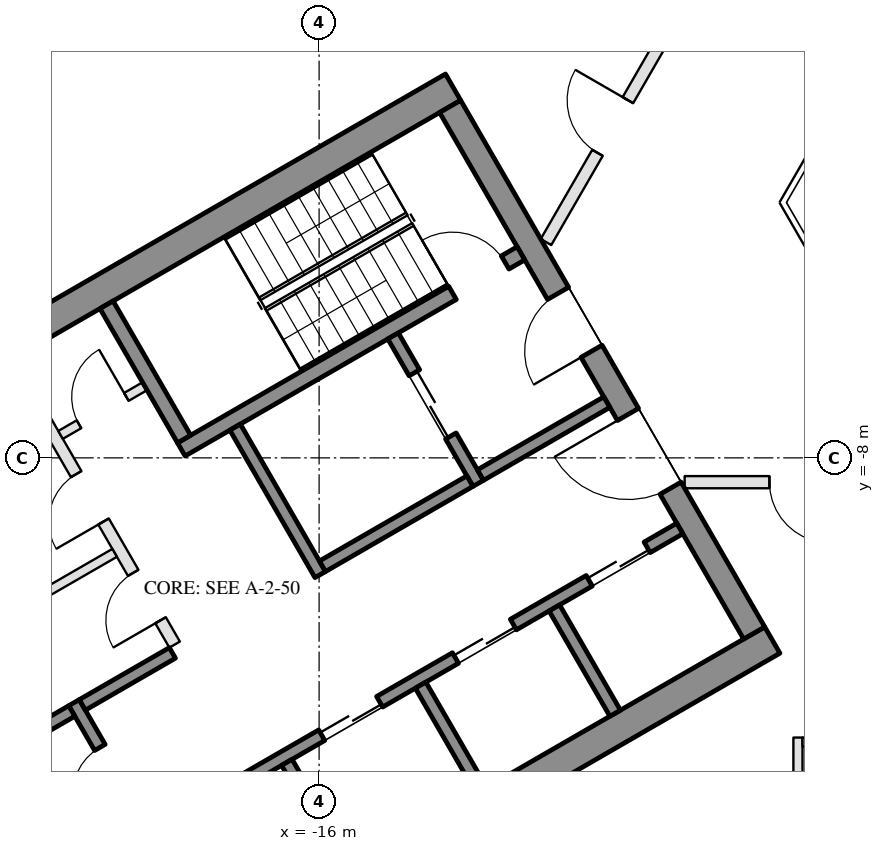
"""IFC4 building model, lengths in metres.
Left out: names, types, materials, properties, quantities, classifications, styles, units other than length and angle.
Written with IfcOpenShell. Run it as: python <this file> out.ifc"""

import sys

from ifc_helpers import new_model, si_unit, direction, frame, frame_2d, origin, place, context, subcontext, project, spatial, rectangle, extrude, element, fill, save


model = new_model("IFC4")
c1 = context("Model", 3, precision=1e-05, world=origin(), true_north=direction((0.0, 1.0)))
c2 = subcontext(c1, "Body", "Model", "MODEL_VIEW")
j1 = project(units=[si_unit("LENGTHUNIT", "METRE"), si_unit("PLANEANGLEUNIT", "RADIAN")], contexts=[c1])
p1 = place(None, origin())
s1 = spatial("IfcSite", under=j1, at=p1, CompositionType="ELEMENT")
p2 = place(p1, origin())
s2 = spatial("IfcBuilding", under=s1, at=p2, CompositionType="ELEMENT")
p3 = place(p2, frame((0.0, 0.0, 216.9)))
s3 = spatial("IfcBuildingStorey", under=s2, at=p3, CompositionType="ELEMENT", Elevation=216.9)
p4 = place(p3, frame((-20.309, 1.934, 0.0), z_axis=(0.0, 0.0, 1.0), x_axis=(-0.499992114976, -0.866029956157, 0.0)))
e1 = element("IfcWall", 1, at=p4, inside=s3, PredefinedType="SOLIDWALL", context=c2, shape_type="SweptSolid", body=[
    extrude(rectangle(XDim=6.74, YDim=0.35, at=frame_2d((3.37, 0.0))), origin(), (0.0, 0.0, 1.0), 3.55),
])
p5 = place(p4, frame((0.77, 0.0, 0.0)))
e2 = element("IfcOpeningElement", 2, at=p5, cuts=e1, PredefinedType="OPENING", context=c2, shape_type="SweptSolid", body=[
    extrude(rectangle(XDim=2.4, YDim=2.4, at=frame_2d((1.2, 1.2))), frame((0.0, 0.185, 0.0), z_axis=(0.0, -1.0, 0.0), x_axis=(1.0, 0.0, 0.0)), (0.0, 0.0, 1.0), 0.37),
])
p6 = place(p4, frame((3.47, 0.0, 0.3)))
e3 = element("IfcOpeningElement", 3, at=p6, cuts=e1, PredefinedType="OPENING", context=c2, shape_type="SweptSolid", body=[
    extrude(rectangle(XDim=2.9, YDim=2.65, at=frame_2d((1.45, 1.325))), frame((0.0, 0.185, 0.0), z_axis=(0.0, -1.0, 0.0), x_axis=(1.0, 0.0, 0.0)), (0.0, 0.0, 1.0), 0.37),
])
for number, where, z_axis, x_axis in (
    (4, (-13.797, -1.903, 0.0), (0.0, 0.0, 1.0), (-0.866, -0.5, 0.0)),
    (5, (-8.547, -10.997, 0.0), (0.0, 0.0, 1.0), (-0.866, -0.5, 0.0)),
):
    element("IfcWall", number, at=place(p3, frame(where, z_axis=z_axis, x_axis=x_axis)), inside=s3, PredefinedType="SHEAR", context=c2, shape_type="SweptSolid", body=[
        extrude(rectangle(XDim=14.837, YDim=0.5, at=frame_2d((7.418, 0.0))), origin(), (0.0, 0.0, 1.0), 3.5),
    ])
p7 = place(p3, frame((-13.845, -2.22, 0.0), z_axis=(0.0, 0.0, 1.0), x_axis=(0.500004234368, -0.866022959057, 0.0)))
e6 = element("IfcWall", 6, at=p7, inside=s3, PredefinedType="SHEAR", context=c2, shape_type="SweptSolid", body=[
    extrude(rectangle(XDim=10.0, YDim=0.4, at=frame_2d((5.0, 0.0))), origin(), (0.0, 0.0, 1.0), 3.5),
])
p8 = place(p7, frame((3.55, 0.0, 0.0)))
e7 = element("IfcOpeningElement", 7, at=p8, cuts=e6, PredefinedType="OPENING", context=c2, shape_type="SweptSolid", body=[
    extrude(rectangle(XDim=1.1, YDim=2.1, at=frame_2d((0.55, 1.05))), frame((0.0, 0.21, 0.0), z_axis=(0.0, -1.0, 0.0), x_axis=(1.0, 0.0, 0.0)), (0.0, 0.0, 1.0), 0.42),
])
p9 = place(p7, frame((5.85, 0.0, 0.0)))
e8 = element("IfcOpeningElement", 8, at=p9, cuts=e6, PredefinedType="OPENING", context=c2, shape_type="SweptSolid", body=[
    extrude(rectangle(XDim=1.4, YDim=2.1, at=frame_2d((0.7, 1.05))), frame((0.0, 0.21, 0.0), z_axis=(0.0, -1.0, 0.0), x_axis=(1.0, 0.0, 0.0)), (0.0, 0.0, 1.0), 0.42),
])
p10 = place(p3, frame((-12.681, -4.636, 0.0), z_axis=(0.0, 0.0, 1.0), x_axis=(-0.866021702275, -0.500006411147, 0.0)))
e9 = element("IfcWall", 9, at=p10, inside=s3, PredefinedType="SHEAR", context=c2, shape_type="SweptSolid", body=[
    extrude(rectangle(XDim=6.45, YDim=0.25, at=frame_2d((3.225, 0.0))), origin(), (0.0, 0.0, 1.0), 3.5),
])
p11 = place(p10, frame((0.3, 0.0, 0.0)))
e10 = element("IfcOpeningElement", 10, at=p11, cuts=e9, PredefinedType="OPENING", context=c2, shape_type="SweptSolid", body=[
    extrude(rectangle(XDim=1.0, YDim=2.1, at=frame_2d((0.5, 1.05))), frame((0.0, 0.135, 0.0), z_axis=(0.0, -1.0, 0.0), x_axis=(1.0, 0.0, 0.0)), (0.0, 0.0, 1.0), 0.27),
])
p12 = place(p3, frame((-19.496, -5.482, 0.0), z_axis=(0.0, 0.0, 1.0), x_axis=(0.499990435942, -0.866030925526, 0.0)))
e11 = element("IfcWall", 11, at=p12, inside=s3, PredefinedType="SHEAR", context=c2, shape_type="SweptSolid", body=[
    extrude(rectangle(XDim=2.55, YDim=0.25, at=frame_2d((1.275, 0.0))), origin(), (0.0, 0.0, 1.0), 3.5),
])
p13 = place(p3, frame((-17.381, -7.495, 0.0), z_axis=(0.0, 0.0, 1.0), x_axis=(0.500011755427, -0.866018616679, 0.0)))
e12 = element("IfcWall", 12, at=p13, inside=s3, PredefinedType="SHEAR", context=c2, shape_type="SweptSolid", body=[
    extrude(rectangle(XDim=2.8, YDim=0.2, at=frame_2d((1.4, 0.0))), origin(), (0.0, 0.0, 1.0), 3.5),
])
p14 = place(p3, frame((-14.783, -5.995, 0.0), z_axis=(0.0, 0.0, 1.0), x_axis=(0.49994636267, -0.866056369097, 0.0)))
e13 = element("IfcWall", 13, at=p14, inside=s3, PredefinedType="SHEAR", context=c2, shape_type="SweptSolid", body=[
    extrude(rectangle(XDim=2.8, YDim=0.2, at=frame_2d((1.4, 0.0))), origin(), (0.0, 0.0, 1.0), 3.5),
])
p15 = place(p14, frame((0.7, 0.0, 0.0)))
e14 = element("IfcOpeningElement", 14, at=p15, cuts=e13, PredefinedType="OPENING", context=c2, shape_type="SweptSolid", body=[
    extrude(rectangle(XDim=1.2, YDim=2.1, at=frame_2d((0.6, 1.05))), frame((0.0, 0.11, 0.0), z_axis=(0.0, -1.0, 0.0), x_axis=(1.0, 0.0, 0.0)), (0.0, 0.0, 1.0), 0.22),
])
p16 = place(p3, frame((-13.52, -8.383, 0.0), z_axis=(0.0, 0.0, 1.0), x_axis=(-0.866034573852, -0.49998411664, 0.0)))
e15 = element("IfcWall", 15, at=p16, inside=s3, PredefinedType="SHEAR", context=c2, shape_type="SweptSolid", body=[
    extrude(rectangle(XDim=2.8, YDim=0.2, at=frame_2d((1.4, 0.0))), origin(), (0.0, 0.0, 1.0), 3.5),
])
p17 = place(p3, frame((-11.268, -7.083, 0.0), z_axis=(0.0, 0.0, 1.0), x_axis=(-0.866050077142, -0.499957262057, 0.0)))
e16 = element("IfcWall", 16, at=p17, inside=s3, PredefinedType="SHEAR", context=c2, shape_type="SweptSolid", body=[
    extrude(rectangle(XDim=2.4, YDim=0.2, at=frame_2d((1.2, 0.0))), origin(), (0.0, 0.0, 1.0), 3.5),
])
p18 = place(p3, frame((-10.068, -9.162, 0.0), z_axis=(0.0, 0.0, 1.0), x_axis=(-0.866032725843, -0.499987317609, 0.0)))
e17 = element("IfcWall", 17, at=p18, inside=s3, PredefinedType="SHEAR", context=c2, shape_type="SweptSolid", body=[
    extrude(rectangle(XDim=10.16, YDim=0.2, at=frame_2d((5.08, 0.0))), origin(), (0.0, 0.0, 1.0), 3.5),
])
p19 = place(p18, frame((0.62, 0.0, 0.0)))
e18 = element("IfcOpeningElement", 18, at=p19, cuts=e17, PredefinedType="OPENING", context=c2, shape_type="SweptSolid", body=[
    extrude(rectangle(XDim=1.1, YDim=2.1, at=frame_2d((0.55, 1.05))), frame((0.0, 0.11, 0.0), z_axis=(0.0, -1.0, 0.0), x_axis=(1.0, 0.0, 0.0)), (0.0, 0.0, 1.0), 0.22),
])
p20 = place(p18, frame((3.16, 0.0, 0.0)))
e19 = element("IfcOpeningElement", 19, at=p20, cuts=e17, PredefinedType="OPENING", context=c2, shape_type="SweptSolid", body=[
    extrude(rectangle(XDim=1.1, YDim=2.1, at=frame_2d((0.55, 1.05))), frame((0.0, 0.11, 0.0), z_axis=(0.0, -1.0, 0.0), x_axis=(1.0, 0.0, 0.0)), (0.0, 0.0, 1.0), 0.22),
])
p21 = place(p18, frame((5.7, 0.0, 0.0)))
e20 = element("IfcOpeningElement", 20, at=p21, cuts=e17, PredefinedType="OPENING", context=c2, shape_type="SweptSolid", body=[
    extrude(rectangle(XDim=1.1, YDim=2.1, at=frame_2d((0.55, 1.05))), frame((0.0, 0.11, 0.0), z_axis=(0.0, -1.0, 0.0), x_axis=(1.0, 0.0, 0.0)), (0.0, 0.0, 1.0), 0.22),
])
p22 = place(p18, frame((8.24, 0.0, 0.0)))
e21 = element("IfcOpeningElement", 21, at=p22, cuts=e17, PredefinedType="OPENING", context=c2, shape_type="SweptSolid", body=[
    extrude(rectangle(XDim=1.1, YDim=2.1, at=frame_2d((0.55, 1.05))), frame((0.0, 0.11, 0.0), z_axis=(0.0, -1.0, 0.0), x_axis=(1.0, 0.0, 0.0)), (0.0, 0.0, 1.0), 0.22),
])
p23 = place(p3, frame((-20.031, -12.026, 0.0), z_axis=(0.0, 0.0, 1.0), x_axis=(0.500033551112, -0.866006032174, 0.0)))
e22 = element("IfcWall", 22, at=p23, inside=s3, PredefinedType="SHEAR", context=c2, shape_type="SweptSolid", body=[
    extrude(rectangle(XDim=2.4, YDim=0.2, at=frame_2d((1.2, 0.0))), origin(), (0.0, 0.0, 1.0), 3.5),
])
p24 = place(p23, frame((0.85, 0.0, 0.0)))
e23 = element("IfcOpeningElement", 23, at=p24, cuts=e22, PredefinedType="OPENING", context=c2, shape_type="SweptSolid", body=[
    extrude(rectangle(XDim=0.9, YDim=2.1, at=frame_2d((0.45, 1.05))), frame((0.0, 0.11, 0.0), z_axis=(0.0, -1.0, 0.0), x_axis=(1.0, 0.0, 0.0)), (0.0, 0.0, 1.0), 0.22),
])
p25 = place(p3, frame((-18.413, -11.208, 0.0), z_axis=(0.0, 0.0, 1.0), x_axis=(-0.866038183914, -0.499977863513, 0.0)))
e24 = element("IfcWall", 24, at=p25, inside=s3, PredefinedType="SHEAR", context=c2, shape_type="SweptSolid", body=[
    extrude(rectangle(XDim=1.71, YDim=0.2, at=frame_2d((0.855, 0.0))), origin(), (0.0, 0.0, 1.0), 3.5),
])
for number, where, z_axis, x_axis in (
    (25, (-12.131, -10.468, 0.0), (0.0, 0.0, 1.0), (0.5, -0.866, 0.0)),
    (26, (-14.331, -11.738, 0.0), (0.0, 0.0, 1.0), (0.5, -0.866, 0.0)),
    (27, (-16.531, -13.008, 0.0), (0.0, 0.0, 1.0), (0.5, -0.866, 0.0)),
):
    element("IfcWall", number, at=place(p3, frame(where, z_axis=z_axis, x_axis=x_axis)), inside=s3, PredefinedType="SHEAR", context=c2, shape_type="SweptSolid", body=[
        extrude(rectangle(XDim=2.0, YDim=0.2, at=frame_2d((1.0, 0.0))), origin(), (0.0, 0.0, 1.0), 3.5),
    ])
p26 = place(p3, frame((-20.067, -12.163, 0.0), z_axis=(0.0, 0.0, 1.0), x_axis=(-0.866055327414, -0.49994816717, 0.0)))
e28 = element("IfcWall", 28, at=p26, inside=s3, PredefinedType="SHEAR", context=c2, shape_type="SweptSolid", body=[
    extrude(rectangle(XDim=2.84, YDim=0.2, at=frame_2d((1.42, 0.0))), origin(), (0.0, 0.0, 1.0), 3.5),
])
p27 = place(p3, frame((-21.076, -6.395, 0.0), z_axis=(0.0, 0.0, 1.0), x_axis=(0.50001468107, -0.866016927499, 0.0)))
e29 = element("IfcWall", 29, at=p27, inside=s3, PredefinedType="PARTITIONING", context=c2, shape_type="SweptSolid", body=[
    extrude(rectangle(XDim=5.4, YDim=0.2, at=frame_2d((2.7, 0.0))), origin(), (0.0, 0.0, 1.0), 3.5),
])
p28 = place(p27, frame((2.163, 0.0, 0.0)))
e30 = element("IfcOpeningElement", 30, at=p28, cuts=e29, PredefinedType="OPENING", context=c2, shape_type="SweptSolid", body=[
    extrude(rectangle(XDim=0.9, YDim=2.1, at=frame_2d((0.45, 1.05))), frame((0.0, 0.11, 0.0), z_axis=(0.0, -1.0, 0.0), x_axis=(1.0, 0.0, 0.0)), (0.0, 0.0, 1.0), 0.22),
])
p29 = place(p27, frame((4.038, 0.0, 0.0)))
e31 = element("IfcOpeningElement", 31, at=p29, cuts=e29, PredefinedType="OPENING", context=c2, shape_type="SweptSolid", body=[
    extrude(rectangle(XDim=0.9, YDim=2.1, at=frame_2d((0.45, 1.05))), frame((0.0, 0.11, 0.0), z_axis=(0.0, -1.0, 0.0), x_axis=(1.0, 0.0, 0.0)), (0.0, 0.0, 1.0), 0.22),
])
p30 = place(p3, frame((-18.866, -6.822, 0.0), z_axis=(0.0, 0.0, 1.0), x_axis=(-0.866028054938, -0.499995408039, 0.0)))
e32 = element("IfcWall", 32, at=p30, inside=s3, PredefinedType="PARTITIONING", context=c2, shape_type="SweptSolid", body=[
    extrude(rectangle(XDim=1.6, YDim=0.15, at=frame_2d((0.8, 0.0))), origin(), (0.0, 0.0, 1.0), 3.5),
])
p31 = place(p30, frame((0.35, 0.0, 0.0)))
e33 = element("IfcOpeningElement", 33, at=p31, cuts=e32, PredefinedType="OPENING", context=c2, shape_type="SweptSolid", body=[
    extrude(rectangle(XDim=0.9, YDim=2.1, at=frame_2d((0.45, 1.05))), frame((0.0, 0.085, 0.0), z_axis=(0.0, -1.0, 0.0), x_axis=(1.0, 0.0, 0.0)), (0.0, 0.0, 1.0), 0.17),
])
p32 = place(p3, frame((-19.363, -9.562, 0.0), z_axis=(0.0, 0.0, 1.0), x_axis=(-0.866016523273, -0.500015381182, 0.0)))
e34 = element("IfcWall", 34, at=p32, inside=s3, PredefinedType="PARTITIONING", context=c2, shape_type="SweptSolid", body=[
    extrude(rectangle(XDim=6.95, YDim=0.15, at=frame_2d((3.475, 0.0))), origin(), (0.0, 0.0, 1.0), 3.5),
])
p33 = place(p3, frame((-6.2, -8.4, 0.0), z_axis=(0.0, 0.0, 1.0), x_axis=(-1.0, 0.0, 0.0)))
e35 = element("IfcWall", 35, at=p33, inside=s3, PredefinedType="PARTITIONING", context=c2, shape_type="SweptSolid", body=[
    extrude(rectangle(XDim=3.788, YDim=0.2, at=frame_2d((1.894, 0.0))), origin(), (0.0, 0.0, 1.0), 2.95),
])
p34 = place(p33, frame((1.394, 0.0, 0.0)))
e36 = element("IfcOpeningElement", 36, at=p34, cuts=e35, PredefinedType="OPENING", context=c2, shape_type="SweptSolid", body=[
    extrude(rectangle(XDim=1.0, YDim=2.1, at=frame_2d((0.5, 1.05))), frame((0.0, 0.11, 0.0), z_axis=(0.0, -1.0, 0.0), x_axis=(1.0, 0.0, 0.0)), (0.0, 0.0, 1.0), 0.22),
])
p35 = place(p3, frame((-8.125, -12.6, 0.0), z_axis=(0.0, 0.0, 1.0), x_axis=(0.0, -1.0, 0.0)))
e37 = element("IfcWall", 37, at=p35, inside=s3, PredefinedType="PARTITIONING", context=c2, shape_type="SweptSolid", body=[
    extrude(rectangle(XDim=2.8, YDim=0.15, at=frame_2d((1.4, 0.0))), origin(), (0.0, 0.0, 1.0), 3.55),
])
p36 = place(p35, frame((1.4, 0.0, 0.0)))
e38 = element("IfcOpeningElement", 38, at=p36, cuts=e37, PredefinedType="OPENING", context=c2, shape_type="SweptSolid", body=[
    extrude(rectangle(XDim=0.9, YDim=2.1, at=frame_2d((0.45, 1.05))), frame((0.0, 0.085, 0.0), z_axis=(0.0, -1.0, 0.0), x_axis=(1.0, 0.0, 0.0)), (0.0, 0.0, 1.0), 0.17),
])
p37 = place(p3, frame((-8.05, -12.675, 0.0), z_axis=(0.0, 0.0, 1.0), x_axis=(1.0, 0.0, 0.0)))
e39 = element("IfcWall", 39, at=p37, inside=s3, PredefinedType="PARTITIONING", context=c2, shape_type="SweptSolid", body=[
    extrude(rectangle(XDim=1.85, YDim=0.15, at=frame_2d((0.925, 0.0))), origin(), (0.0, 0.0, 1.0), 2.95),
])
p38 = place(p3, frame((-12.269, -4.45, 0.0), z_axis=(0.0, 0.0, 1.0), x_axis=(0.499998569178, 0.866026229868, 0.0)))
e40 = element("IfcWall", 40, at=p38, inside=s3, PredefinedType="PARTITIONING", context=c2, shape_type="SweptSolid", body=[
    extrude(rectangle(XDim=4.388, YDim=0.2, at=frame_2d((2.194, 0.0))), origin(), (0.0, 0.0, 1.0), 2.95),
])
p39 = place(p38, frame((1.694, 0.0, 0.0)))
e41 = element("IfcOpeningElement", 41, at=p39, cuts=e40, PredefinedType="OPENING", context=c2, shape_type="SweptSolid", body=[
    extrude(rectangle(XDim=1.0, YDim=2.1, at=frame_2d((0.5, 1.05))), frame((0.0, 0.11, 0.0), z_axis=(0.0, -1.0, 0.0), x_axis=(1.0, 0.0, 0.0)), (0.0, 0.0, 1.0), 0.22),
])
p40 = place(p15, origin())
e42 = element("IfcDoor", 42, at=p40, inside=s3, OperationType="DOUBLE_DOOR_SLIDING", PredefinedType="DOOR", context=c2, shape_type="SweptSolid", body=[
    extrude(rectangle(XDim=1.2, YDim=2.1, at=frame_2d((0.6, 1.05))), frame((0.0, 0.025, 0.0), z_axis=(0.0, -1.0, 0.0), x_axis=(1.0, 0.0, 0.0)), (0.0, 0.0, 1.0), 0.05),
])
fill(e14, e42)
p41 = place(p31, frame((0.9, 0.0, 0.0), z_axis=(0.0, 0.0, 1.0), x_axis=(-1.0, 0.0, 0.0)))
e43 = element("IfcDoor", 43, at=p41, inside=s3, OperationType="SINGLE_SWING_RIGHT", PredefinedType="DOOR", context=c2, shape_type="SweptSolid", body=[
    extrude(rectangle(XDim=0.9, YDim=2.1, at=frame_2d((0.45, 1.05))), frame((0.0, 0.025, 0.0), z_axis=(0.0, -1.0, 0.0), x_axis=(1.0, 0.0, 0.0)), (0.0, 0.0, 1.0), 0.05),
])
fill(e33, e43)
p42 = place(p19, origin())
e44 = element("IfcDoor", 44, at=p42, inside=s3, OperationType="DOUBLE_DOOR_SLIDING", PredefinedType="DOOR", context=c2, shape_type="SweptSolid", body=[
    extrude(rectangle(XDim=1.1, YDim=2.1, at=frame_2d((0.55, 1.05))), frame((0.0, 0.025, 0.0), z_axis=(0.0, -1.0, 0.0), x_axis=(1.0, 0.0, 0.0)), (0.0, 0.0, 1.0), 0.05),
])
fill(e18, e44)
p43 = place(p20, origin())
e45 = element("IfcDoor", 45, at=p43, inside=s3, OperationType="DOUBLE_DOOR_SLIDING", PredefinedType="DOOR", context=c2, shape_type="SweptSolid", body=[
    extrude(rectangle(XDim=1.1, YDim=2.1, at=frame_2d((0.55, 1.05))), frame((0.0, 0.025, 0.0), z_axis=(0.0, -1.0, 0.0), x_axis=(1.0, 0.0, 0.0)), (0.0, 0.0, 1.0), 0.05),
])
fill(e19, e45)
p44 = place(p21, origin())
e46 = element("IfcDoor", 46, at=p44, inside=s3, OperationType="DOUBLE_DOOR_SLIDING", PredefinedType="DOOR", context=c2, shape_type="SweptSolid", body=[
    extrude(rectangle(XDim=1.1, YDim=2.1, at=frame_2d((0.55, 1.05))), frame((0.0, 0.025, 0.0), z_axis=(0.0, -1.0, 0.0), x_axis=(1.0, 0.0, 0.0)), (0.0, 0.0, 1.0), 0.05),
])
fill(e20, e46)
p45 = place(p24, frame((0.9, 0.0, 0.0), z_axis=(0.0, 0.0, 1.0), x_axis=(-1.0, 0.0, 0.0)))
e47 = element("IfcDoor", 47, at=p45, inside=s3, OperationType="SINGLE_SWING_LEFT", PredefinedType="DOOR", context=c2, shape_type="SweptSolid", body=[
    extrude(rectangle(XDim=0.9, YDim=2.1, at=frame_2d((0.45, 1.05))), frame((0.0, 0.025, 0.0), z_axis=(0.0, -1.0, 0.0), x_axis=(1.0, 0.0, 0.0)), (0.0, 0.0, 1.0), 0.05),
])
fill(e23, e47)
p46 = place(p28, frame((0.9, 0.0, 0.0), z_axis=(0.0, 0.0, 1.0), x_axis=(-1.0, 0.0, 0.0)))
e48 = element("IfcDoor", 48, at=p46, inside=s3, OperationType="SINGLE_SWING_LEFT", PredefinedType="DOOR", context=c2, shape_type="SweptSolid", body=[
    extrude(rectangle(XDim=0.9, YDim=2.1, at=frame_2d((0.45, 1.05))), frame((0.0, 0.025, 0.0), z_axis=(0.0, -1.0, 0.0), x_axis=(1.0, 0.0, 0.0)), (0.0, 0.0, 1.0), 0.05),
])
fill(e30, e48)
p47 = place(p29, frame((0.9, 0.0, 0.0), z_axis=(0.0, 0.0, 1.0), x_axis=(-1.0, 0.0, 0.0)))
e49 = element("IfcDoor", 49, at=p47, inside=s3, OperationType="SINGLE_SWING_LEFT", PredefinedType="DOOR", context=c2, shape_type="SweptSolid", body=[
    extrude(rectangle(XDim=0.9, YDim=2.1, at=frame_2d((0.45, 1.05))), frame((0.0, 0.025, 0.0), z_axis=(0.0, -1.0, 0.0), x_axis=(1.0, 0.0, 0.0)), (0.0, 0.0, 1.0), 0.05),
])
fill(e31, e49)
p48 = place(p8, frame((1.1, 0.0, 0.0), z_axis=(0.0, 0.0, 1.0), x_axis=(-1.0, 0.0, 0.0)))
e50 = element("IfcDoor", 50, at=p48, inside=s3, OperationType="SINGLE_SWING_LEFT", PredefinedType="DOOR", context=c2, shape_type="SweptSolid", body=[
    extrude(rectangle(XDim=1.1, YDim=2.1, at=frame_2d((0.55, 1.05))), frame((0.0, 0.025, 0.0), z_axis=(0.0, -1.0, 0.0), x_axis=(1.0, 0.0, 0.0)), (0.0, 0.0, 1.0), 0.05),
])
fill(e7, e50)
p49 = place(p9, frame((1.4, 0.0, 0.0), z_axis=(0.0, 0.0, 1.0), x_axis=(-1.0, 0.0, 0.0)))
e51 = element("IfcDoor", 51, at=p49, inside=s3, OperationType="DOUBLE_DOOR_SINGLE_SWING", PredefinedType="DOOR", context=c2, shape_type="SweptSolid", body=[
    extrude(rectangle(XDim=1.4, YDim=2.1, at=frame_2d((0.7, 1.05))), frame((0.0, 0.025, 0.0), z_axis=(0.0, -1.0, 0.0), x_axis=(1.0, 0.0, 0.0)), (0.0, 0.0, 1.0), 0.05),
])
fill(e8, e51)
p50 = place(p11, frame((1.0, 0.0, 0.0), z_axis=(0.0, 0.0, 1.0), x_axis=(-1.0, 0.0, 0.0)))
e52 = element("IfcDoor", 52, at=p50, inside=s3, OperationType="SINGLE_SWING_LEFT", PredefinedType="DOOR", context=c2, shape_type="SweptSolid", body=[
    extrude(rectangle(XDim=1.0, YDim=2.1, at=frame_2d((0.5, 1.05))), frame((0.0, 0.025, 0.0), z_axis=(0.0, -1.0, 0.0), x_axis=(1.0, 0.0, 0.0)), (0.0, 0.0, 1.0), 0.05),
])
fill(e10, e52)
p51 = place(p34, origin())
e53 = element("IfcDoor", 53, at=p51, inside=s3, OperationType="SINGLE_SWING_LEFT", PredefinedType="DOOR", context=c2, shape_type="SweptSolid", body=[
    extrude(rectangle(XDim=1.0, YDim=2.1, at=frame_2d((0.5, 1.05))), frame((0.0, 0.025, 0.0), z_axis=(0.0, -1.0, 0.0), x_axis=(1.0, 0.0, 0.0)), (0.0, 0.0, 1.0), 0.05),
])
fill(e36, e53)
p52 = place(p39, origin())
e54 = element("IfcDoor", 54, at=p52, inside=s3, OperationType="SINGLE_SWING_RIGHT", PredefinedType="DOOR", context=c2, shape_type="SweptSolid", body=[
    extrude(rectangle(XDim=1.0, YDim=2.1, at=frame_2d((0.5, 1.05))), frame((0.0, 0.025, 0.0), z_axis=(0.0, -1.0, 0.0), x_axis=(1.0, 0.0, 0.0)), (0.0, 0.0, 1.0), 0.05),
])
fill(e41, e54)
save(model, sys.argv[1])
